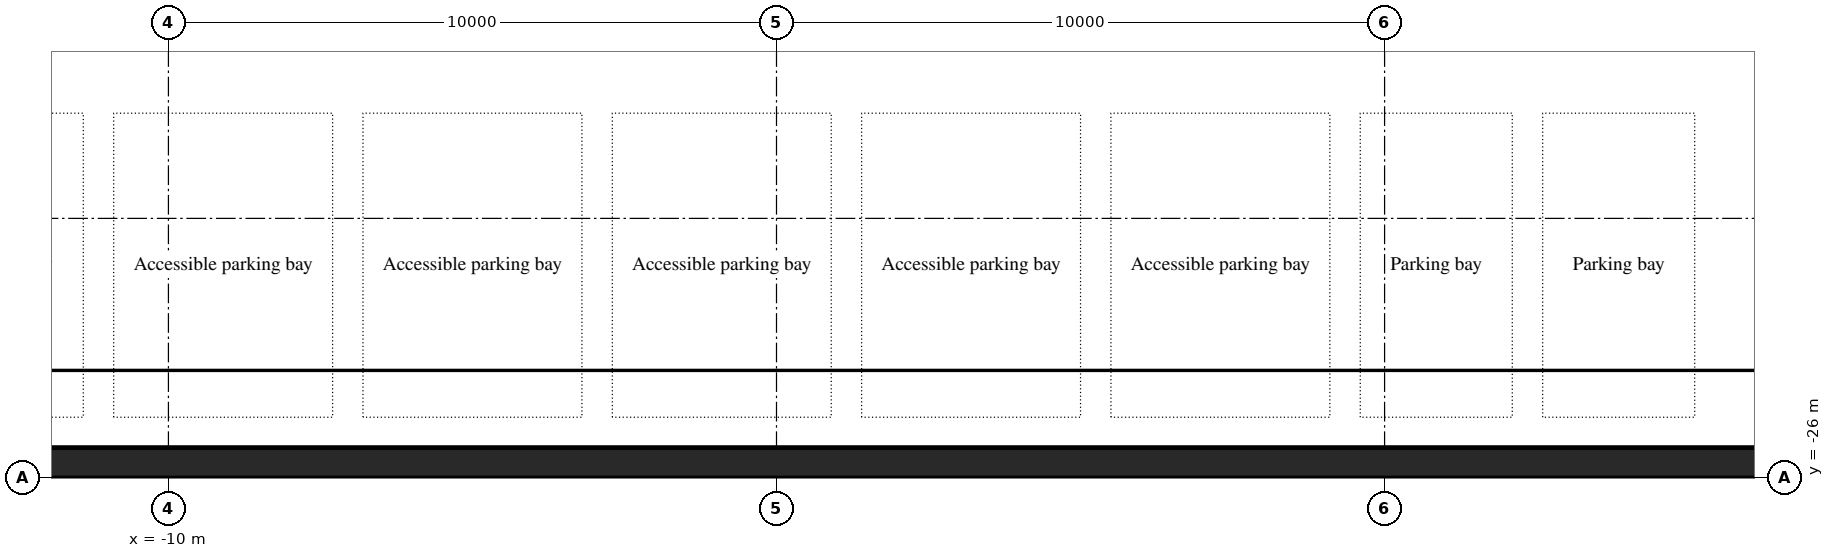
"""IFC4 building model, lengths in metres.
Left out: names, types, materials, properties, quantities, classifications, styles, units other than length and angle.
Written with IfcOpenShell. Run it as: python <this file> out.ifc"""

import sys

from ifc_helpers import new_model, si_unit, direction, frame, frame_2d, origin, place, context, subcontext, project, spatial, rectangle, extrude, element, save


model = new_model("IFC4")
c1 = context("Model", 3, precision=1e-05, world=origin(), true_north=direction((0.0, 1.0)))
c2 = subcontext(c1, "Body", "Model", "MODEL_VIEW")
j1 = project(units=[si_unit("LENGTHUNIT", "METRE"), si_unit("PLANEANGLEUNIT", "RADIAN")], contexts=[c1])
p1 = place(None, origin())
s1 = spatial("IfcSite", under=j1, at=p1, CompositionType="ELEMENT")
p2 = place(p1, origin())
s2 = spatial("IfcBuilding", under=s1, at=p2, CompositionType="ELEMENT")
p3 = place(p2, frame((0.0, 0.0, -8.4)))
s3 = spatial("IfcBuildingStorey", under=s2, at=p3, CompositionType="ELEMENT", Elevation=-8.4)
p4 = place(p3, frame((-40.0, -25.75, -0.4), z_axis=(0.0, 0.0, 1.0), x_axis=(1.0, 0.0, 0.0)))
e1 = element("IfcWall", 1, at=p4, inside=s3, PredefinedType="SOLIDWALL", context=c2, shape_type="SweptSolid", body=[
    extrude(rectangle(XDim=80.0, YDim=0.5, at=frame_2d((40.0, 0.0))), origin(), (0.0, 0.0, 1.0), 4.22),
])
save(model, sys.argv[1])
